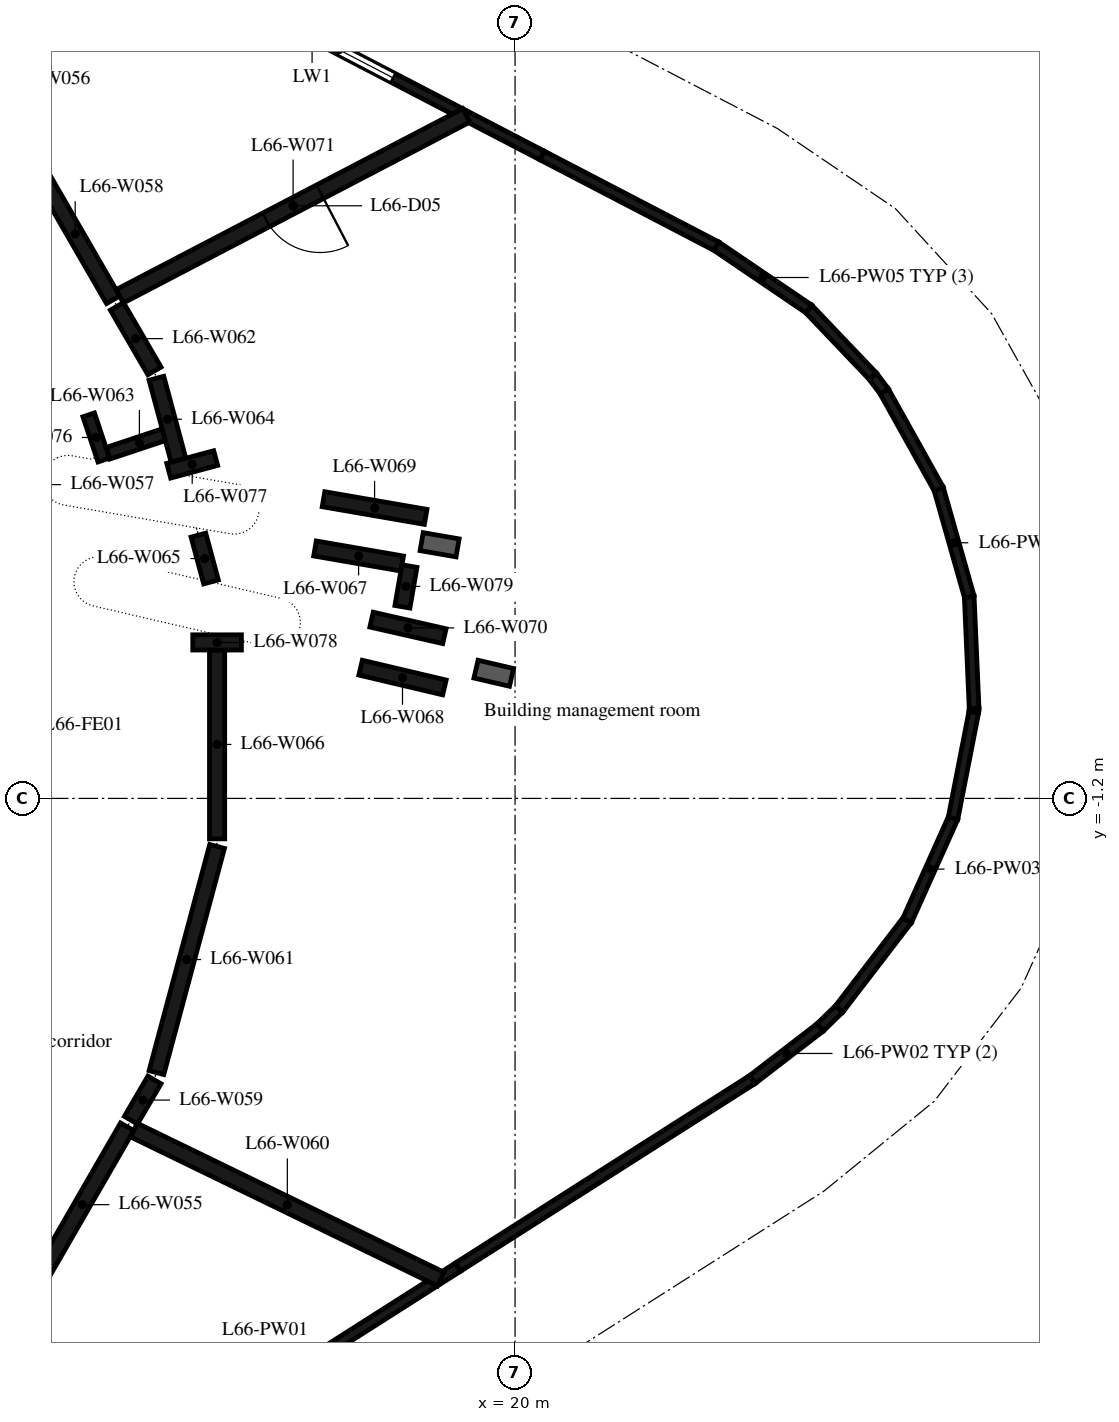
"""IFC4 building model, lengths in metres.
Left out: names, types, materials, properties, quantities, classifications, styles, units other than length and angle.
Written with IfcOpenShell. Run it as: python <this file> out.ifc"""

import sys

from ifc_helpers import new_model, si_unit, direction, frame, frame_2d, origin, place, context, subcontext, project, spatial, rectangle, extrude, element, fill, save


model = new_model("IFC4")
c1 = context("Model", 3, precision=1e-05, world=origin(), true_north=direction((0.0, 1.0)))
c2 = subcontext(c1, "Body", "Model", "MODEL_VIEW")
j1 = project(units=[si_unit("LENGTHUNIT", "METRE"), si_unit("PLANEANGLEUNIT", "RADIAN")], contexts=[c1])
p1 = place(None, origin())
s1 = spatial("IfcSite", under=j1, at=p1, CompositionType="ELEMENT")
p2 = place(p1, origin())
s2 = spatial("IfcBuilding", under=s1, at=p2, CompositionType="ELEMENT")
p3 = place(p2, frame((0.0, 0.0, 258.2)))
s3 = spatial("IfcBuildingStorey", under=s2, at=p3, CompositionType="ELEMENT", Elevation=258.2)
p4 = place(p3, frame((12.715, -12.951, 0.0), z_axis=(0.0, 0.0, 1.0), x_axis=(0.843393042763, 0.537297101629, 0.0)))
e1 = element("IfcWall", 1, at=p4, inside=s3, PredefinedType="STANDARD", context=c2, shape_type="SweptSolid", body=[
    extrude(rectangle(XDim=7.53, YDim=0.16, at=frame_2d((3.765, 0.0))), origin(), (0.0, 0.0, 1.0), 4.75),
])
p5 = place(p3, frame((19.066, -8.905, 0.0), z_axis=(0.0, 0.0, 1.0), x_axis=(0.843393436183, 0.537296484079, 0.0)))
e2 = element("IfcWall", 2, at=p5, inside=s3, PredefinedType="STANDARD", context=c2, shape_type="SweptSolid", body=[
    extrude(rectangle(XDim=5.74, YDim=0.16, at=frame_2d((2.87, 0.0))), origin(), (0.0, 0.0, 1.0), 4.75),
])
p6 = place(p3, frame((23.904, -5.823, 0.0), z_axis=(0.0, 0.0, 1.0), x_axis=(0.792514141733, 0.609853535821, 0.0)))
e3 = element("IfcWall", 3, at=p6, inside=s3, PredefinedType="STANDARD", context=c2, shape_type="SweptSolid", body=[
    extrude(rectangle(XDim=1.405, YDim=0.16, at=frame_2d((0.702, 0.0))), origin(), (0.0, 0.0, 1.0), 4.75),
])
p7 = place(p3, frame((25.017, -4.966, 0.0), z_axis=(0.0, 0.0, 1.0), x_axis=(0.71617993341, 0.697915684722, 0.0)))
e4 = element("IfcWall", 4, at=p7, inside=s3, PredefinedType="STANDARD", context=c2, shape_type="SweptSolid", body=[
    extrude(rectangle(XDim=0.441, YDim=0.16, at=frame_2d((0.221, 0.0))), origin(), (0.0, 0.0, 1.0), 4.75),
])
p8 = place(p3, frame((25.329, -4.663, 0.0), z_axis=(0.0, 0.0, 1.0), x_axis=(0.60876459751, 0.793350909005, 0.0)))
e5 = element("IfcWall", 5, at=p8, inside=s3, PredefinedType="STANDARD", context=c2, shape_type="SweptSolid", body=[
    extrude(rectangle(XDim=1.846, YDim=0.16, at=frame_2d((0.923, 0.0))), origin(), (0.0, 0.0, 1.0), 4.75),
])
p9 = place(p3, frame((26.449, -3.206, 0.0), z_axis=(0.0, 0.0, 1.0), x_axis=(0.40935930532, 0.912373256484, 0.0)))
e6 = element("IfcWall", 6, at=p9, inside=s3, PredefinedType="STANDARD", context=c2, shape_type="SweptSolid", body=[
    extrude(rectangle(XDim=1.848, YDim=0.16, at=frame_2d((0.924, 0.0))), origin(), (0.0, 0.0, 1.0), 4.75),
])
p10 = place(p3, frame((27.202, -1.528, 0.0), z_axis=(0.0, 0.0, 1.0), x_axis=(0.191845193918, 0.981425199172, 0.0)))
e7 = element("IfcWall", 7, at=p10, inside=s3, PredefinedType="STANDARD", context=c2, shape_type="SweptSolid", body=[
    extrude(rectangle(XDim=1.782, YDim=0.16, at=frame_2d((0.891, 0.0))), origin(), (0.0, 0.0, 1.0), 4.75),
])
p11 = place(p3, frame((27.544, 0.22, 0.0), z_axis=(0.0, 0.0, 1.0), x_axis=(0.078997625987, 0.99687480412, 0.0)))
e8 = element("IfcWall", 8, at=p11, inside=s3, PredefinedType="STANDARD", context=c2, shape_type="SweptSolid", body=[
    extrude(rectangle(XDim=0.065, YDim=0.16, at=frame_2d((0.032, 0.0))), origin(), (0.0, 0.0, 1.0), 4.75),
])
p12 = place(p3, frame((27.549, 0.28, 0.0), z_axis=(0.0, 0.0, 1.0), x_axis=(-0.043775840119, 0.999041378433, 0.0)))
e9 = element("IfcWall", 9, at=p12, inside=s3, PredefinedType="STANDARD", context=c2, shape_type="SweptSolid", body=[
    extrude(rectangle(XDim=1.846, YDim=0.16, at=frame_2d((0.923, 0.0))), origin(), (0.0, 0.0, 1.0), 4.75),
])
p13 = place(p3, frame((27.47, 2.115, 0.0), z_axis=(0.0, 0.0, 1.0), x_axis=(-0.272871538813, 0.962050478564, 0.0)))
e10 = element("IfcWall", 10, at=p13, inside=s3, PredefinedType="STANDARD", context=c2, shape_type="SweptSolid", body=[
    extrude(rectangle(XDim=1.848, YDim=0.16, at=frame_2d((0.924, 0.0))), origin(), (0.0, 0.0, 1.0), 4.75),
])
p14 = place(p3, frame((26.969, 3.885, 0.0), z_axis=(0.0, 0.0, 1.0), x_axis=(-0.487427123616, 0.873163672609, 0.0)))
e11 = element("IfcWall", 11, at=p14, inside=s3, PredefinedType="STANDARD", context=c2, shape_type="SweptSolid", body=[
    extrude(rectangle(XDim=1.846, YDim=0.16, at=frame_2d((0.923, 0.0))), origin(), (0.0, 0.0, 1.0), 4.75),
])
p15 = place(p3, frame((26.073, 5.492, 0.0), z_axis=(0.0, 0.0, 1.0), x_axis=(-0.601113450899, 0.799163699844, 0.0)))
e12 = element("IfcWall", 12, at=p15, inside=s3, PredefinedType="STANDARD", context=c2, shape_type="SweptSolid", body=[
    extrude(rectangle(XDim=0.316, YDim=0.16, at=frame_2d((0.158, 0.0))), origin(), (0.0, 0.0, 1.0), 4.75),
])
p16 = place(p3, frame((25.883, 5.745, 0.0), z_axis=(0.0, 0.0, 1.0), x_axis=(-0.690013213635, 0.723796770515, 0.0)))
e13 = element("IfcWall", 13, at=p16, inside=s3, PredefinedType="STANDARD", context=c2, shape_type="SweptSolid", body=[
    extrude(rectangle(XDim=1.532, YDim=0.16, at=frame_2d((0.766, 0.0))), origin(), (0.0, 0.0, 1.0), 4.75),
])
p17 = place(p3, frame((24.832, 6.848, 0.0), z_axis=(0.0, 0.0, 1.0), x_axis=(-0.82733964769, 0.561701973791, 0.0)))
e14 = element("IfcWall", 14, at=p17, inside=s3, PredefinedType="STANDARD", context=c2, shape_type="SweptSolid", body=[
    extrude(rectangle(XDim=1.845, YDim=0.16, at=frame_2d((0.923, 0.0))), origin(), (0.0, 0.0, 1.0), 4.75),
])
p18 = place(p3, frame((23.309, 7.882, 0.0), z_axis=(0.0, 0.0, 1.0), x_axis=(-0.887023709697, 0.461723876831, 0.0)))
e15 = element("IfcWall", 15, at=p18, inside=s3, PredefinedType="STANDARD", context=c2, shape_type="SweptSolid", body=[
    extrude(rectangle(XDim=3.231, YDim=0.16, at=frame_2d((1.615, 0.0))), origin(), (0.0, 0.0, 1.0), 4.75),
])
p19 = place(p3, frame((20.443, 9.374, 0.0), z_axis=(0.0, 0.0, 1.0), x_axis=(-0.88700649569, 0.461756945377, 0.0)))
e16 = element("IfcWall", 16, at=p19, inside=s3, PredefinedType="STANDARD", context=c2, shape_type="SweptSolid", body=[
    extrude(rectangle(XDim=7.53, YDim=0.16, at=frame_2d((3.765, 0.0))), origin(), (0.0, 0.0, 1.0), 4.75),
])
p20 = place(p19, frame((2.763, 0.0, 1.0)))
e17 = element("IfcOpeningElement", 17, at=p20, cuts=e16, PredefinedType="OPENING", context=c2, shape_type="SweptSolid", body=[
    extrude(rectangle(XDim=3.0, YDim=2.2, at=frame_2d((1.5, 1.1))), frame((0.0, 0.09, 0.0), z_axis=(0.0, -1.0, 0.0), x_axis=(1.0, 0.0, 0.0)), (0.0, 0.0, 1.0), 0.18),
])
p21 = place(p3, frame((12.142, -9.162, 0.0), z_axis=(0.0, 0.0, 1.0), x_axis=(0.499717688814, 0.866188334882, 0.0)))
e18 = element("IfcWall", 18, at=p21, inside=s3, PredefinedType="PARTITIONING", context=c2, shape_type="SweptSolid", body=[
    extrude(rectangle(XDim=2.957, YDim=0.25, at=frame_2d((1.479, 0.0))), origin(), (0.0, 0.0, 1.0), 4.75),
])
p22 = place(p3, frame((13.39, 7.0, 0.0), z_axis=(0.0, 0.0, 1.0), x_axis=(-0.499790202325, 0.86614649665, 0.0)))
e19 = element("IfcWall", 19, at=p22, inside=s3, PredefinedType="PARTITIONING", context=c2, shape_type="SweptSolid", body=[
    extrude(rectangle(XDim=2.496, YDim=0.25, at=frame_2d((1.248, 0.0))), origin(), (0.0, 0.0, 1.0), 4.75),
])
p23 = place(p3, frame((13.683, -6.492, 0.0), z_axis=(0.0, 0.0, 1.0), x_axis=(0.504583428371, 0.863362938638, 0.0)))
e20 = element("IfcWall", 20, at=p23, inside=s3, PredefinedType="PARTITIONING", context=c2, shape_type="SweptSolid", body=[
    extrude(rectangle(XDim=0.767, YDim=0.25, at=frame_2d((0.383, 0.0))), origin(), (0.0, 0.0, 1.0), 4.75),
])
p24 = place(p3, frame((13.732, -6.655, 0.0), z_axis=(0.0, 0.0, 1.0), x_axis=(0.899529661215, -0.436859689825, 0.0)))
e21 = element("IfcWall", 21, at=p24, inside=s3, PredefinedType="PARTITIONING", context=c2, shape_type="SweptSolid", body=[
    extrude(rectangle(XDim=5.609, YDim=0.25, at=frame_2d((2.805, 0.0))), origin(), (0.0, 0.0, 1.0), 4.75),
])
p25 = place(p3, frame((14.102, -5.709, 0.0), z_axis=(0.0, 0.0, 1.0), x_axis=(0.259118468411, 0.965845546311, 0.0)))
e22 = element("IfcWall", 22, at=p25, inside=s3, PredefinedType="PARTITIONING", context=c2, shape_type="SweptSolid", body=[
    extrude(rectangle(XDim=3.851, YDim=0.25, at=frame_2d((1.925, 0.0))), origin(), (0.0, 0.0, 1.0), 4.75),
])
p26 = place(p3, frame((14.07, 5.83, 0.0), z_axis=(0.0, 0.0, 1.0), x_axis=(-0.502547897079, 0.864549368828, 0.0)))
e23 = element("IfcWall", 23, at=p26, inside=s3, PredefinedType="PARTITIONING", context=c2, shape_type="SweptSolid", body=[
    extrude(rectangle(XDim=1.228, YDim=0.25, at=frame_2d((0.614, 0.0))), origin(), (0.0, 0.0, 1.0), 4.75),
])
p27 = place(p3, frame((14.34, 4.82, 0.0), z_axis=(0.0, 0.0, 1.0), x_axis=(-0.948660926874, -0.316294871634, 0.0)))
e24 = element("IfcWall", 24, at=p27, inside=s3, PredefinedType="PARTITIONING", context=c2, shape_type="SweptSolid", body=[
    extrude(rectangle(XDim=1.092, YDim=0.2, at=frame_2d((0.546, 0.0))), origin(), (0.0, 0.0, 1.0), 4.75),
])
p28 = place(p3, frame((14.465, 4.361, 0.0), z_axis=(0.0, 0.0, 1.0), x_axis=(-0.259741378437, 0.965678215726, 0.0)))
e25 = element("IfcWall", 25, at=p28, inside=s3, PredefinedType="PARTITIONING", context=c2, shape_type="SweptSolid", body=[
    extrude(rectangle(XDim=1.396, YDim=0.25, at=frame_2d((0.698, 0.0))), origin(), (0.0, 0.0, 1.0), 4.75),
])
p29 = place(p3, frame((15.0, 2.36, 0.0), z_axis=(0.0, 0.0, 1.0), x_axis=(-0.260445943037, 0.965488431187, 0.0)))
e26 = element("IfcWall", 26, at=p29, inside=s3, PredefinedType="PARTITIONING", context=c2, shape_type="SweptSolid", body=[
    extrude(rectangle(XDim=0.797, YDim=0.25, at=frame_2d((0.398, 0.0))), origin(), (0.0, 0.0, 1.0), 4.75),
])
p30 = place(p3, frame((15.1, -1.865, 0.0), z_axis=(0.0, 0.0, 1.0), x_axis=(0.0, 1.0, 0.0)))
e27 = element("IfcWall", 27, at=p30, inside=s3, PredefinedType="PARTITIONING", context=c2, shape_type="SweptSolid", body=[
    extrude(rectangle(XDim=3.105, YDim=0.25, at=frame_2d((1.552, 0.0))), origin(), (0.0, 0.0, 1.0), 4.75),
])
p31 = place(p3, frame((16.71, 2.91, 0.0), z_axis=(0.0, 0.0, 1.0), x_axis=(0.985443639096, -0.170002453407, 0.0)))
e28 = element("IfcWall", 28, at=p31, inside=s3, PredefinedType="PARTITIONING", context=c2, shape_type="SweptSolid", body=[
    extrude(rectangle(XDim=1.455, YDim=0.25, at=frame_2d((0.728, 0.0))), origin(), (0.0, 0.0, 1.0), 4.75),
])
p32 = place(p3, frame((17.46, 0.95, 0.0), z_axis=(0.0, 0.0, 1.0), x_axis=(0.973281351015, -0.229615791632, 0.0)))
e29 = element("IfcWall", 29, at=p32, inside=s3, PredefinedType="PARTITIONING", context=c2, shape_type="SweptSolid", body=[
    extrude(rectangle(XDim=1.416, YDim=0.25, at=frame_2d((0.708, 0.0))), origin(), (0.0, 0.0, 1.0), 4.75),
])
p33 = place(p3, frame((18.53, 3.43, 0.0), z_axis=(0.0, 0.0, 1.0), x_axis=(-0.985421228399, 0.170132309161, 0.0)))
e30 = element("IfcWall", 30, at=p33, inside=s3, PredefinedType="PARTITIONING", context=c2, shape_type="SweptSolid", body=[
    extrude(rectangle(XDim=1.705, YDim=0.25, at=frame_2d((0.853, 0.0))), origin(), (0.0, 0.0, 1.0), 4.75),
])
p34 = place(p3, frame((18.838, 1.468, 0.0), z_axis=(0.0, 0.0, 1.0), x_axis=(-0.975152369329, 0.221535226528, 0.0)))
e31 = element("IfcWall", 31, at=p34, inside=s3, PredefinedType="PARTITIONING", context=c2, shape_type="SweptSolid", body=[
    extrude(rectangle(XDim=1.229, YDim=0.25, at=frame_2d((0.614, 0.0))), origin(), (0.0, 0.0, 1.0), 4.75),
])
p35 = place(p3, frame((19.199, 10.033, 0.0), z_axis=(0.0, 0.0, 1.0), x_axis=(-0.886450722397, -0.462822986424, 0.0)))
e32 = element("IfcWall", 32, at=p35, inside=s3, PredefinedType="PARTITIONING", context=c2, shape_type="SweptSolid", body=[
    extrude(rectangle(XDim=6.428, YDim=0.25, at=frame_2d((3.214, 0.0))), origin(), (0.0, 0.0, 1.0), 4.75),
])
p36 = place(p35, frame((2.714, 0.0, 0.0)))
e33 = element("IfcOpeningElement", 33, at=p36, cuts=e32, PredefinedType="OPENING", context=c2, shape_type="SweptSolid", body=[
    extrude(rectangle(XDim=1.0, YDim=2.1, at=frame_2d((0.5, 1.05))), frame((0.0, 0.135, 0.0), z_axis=(0.0, -1.0, 0.0), x_axis=(1.0, 0.0, 0.0)), (0.0, 0.0, 1.0), 0.27),
])
p37 = place(p3, frame((12.988, 5.107, 0.0), z_axis=(0.0, 0.0, 1.0), x_axis=(0.316414803104, -0.948620931867, 0.0)))
e34 = element("IfcWall", 34, at=p37, inside=s3, PredefinedType="PARTITIONING", context=c2, shape_type="SweptSolid", body=[
    extrude(rectangle(XDim=0.783, YDim=0.2, at=frame_2d((0.392, 0.0))), origin(), (0.0, 0.0, 1.0), 4.75),
])
p38 = place(p3, frame((14.304, 4.189, 0.0), z_axis=(0.0, 0.0, 1.0), x_axis=(0.965680559049, 0.259732666167, 0.0)))
e35 = element("IfcWall", 35, at=p38, inside=s3, PredefinedType="PARTITIONING", context=c2, shape_type="SweptSolid", body=[
    extrude(rectangle(XDim=0.8, YDim=0.25, at=frame_2d((0.4, 0.0))), origin(), (0.0, 0.0, 1.0), 4.75),
])
p39 = place(p3, frame((15.5, 1.365, 0.0), z_axis=(0.0, 0.0, 1.0), x_axis=(-1.0, 0.0, 0.0)))
e36 = element("IfcWall", 36, at=p39, inside=s3, PredefinedType="PARTITIONING", context=c2, shape_type="SweptSolid", body=[
    extrude(rectangle(XDim=0.8, YDim=0.25, at=frame_2d((0.4, 0.0))), origin(), (0.0, 0.0, 1.0), 4.75),
])
p40 = place(p3, frame((18.148, 1.951, 0.0), z_axis=(0.0, 0.0, 1.0), x_axis=(0.169991160734, 0.98544558717, 0.0)))
e37 = element("IfcWall", 37, at=p40, inside=s3, PredefinedType="PARTITIONING", context=c2, shape_type="SweptSolid", body=[
    extrude(rectangle(XDim=0.679, YDim=0.25, at=frame_2d((0.34, 0.0))), origin(), (0.0, 0.0, 1.0), 4.75),
])
p41 = place(p20, origin())
e38 = element("IfcWindow", 38, at=p41, inside=s3, PartitioningType="SINGLE_PANEL", PredefinedType="WINDOW", context=c2, shape_type="SweptSolid", body=[
    extrude(rectangle(XDim=3.0, YDim=2.2, at=frame_2d((1.5, 1.1))), frame((0.0, 0.03, 0.0), z_axis=(0.0, -1.0, 0.0), x_axis=(1.0, 0.0, 0.0)), (0.0, 0.0, 1.0), 0.06),
])
fill(e17, e38)
p42 = place(p36, origin())
e39 = element("IfcDoor", 39, at=p42, inside=s3, OperationType="SINGLE_SWING_LEFT", PredefinedType="DOOR", context=c2, shape_type="SweptSolid", body=[
    extrude(rectangle(XDim=1.0, YDim=2.1, at=frame_2d((0.5, 1.05))), frame((0.0, 0.025, 0.0), z_axis=(0.0, -1.0, 0.0), x_axis=(1.0, 0.0, 0.0)), (0.0, 0.0, 1.0), 0.05),
])
fill(e33, e39)
save(model, sys.argv[1])
